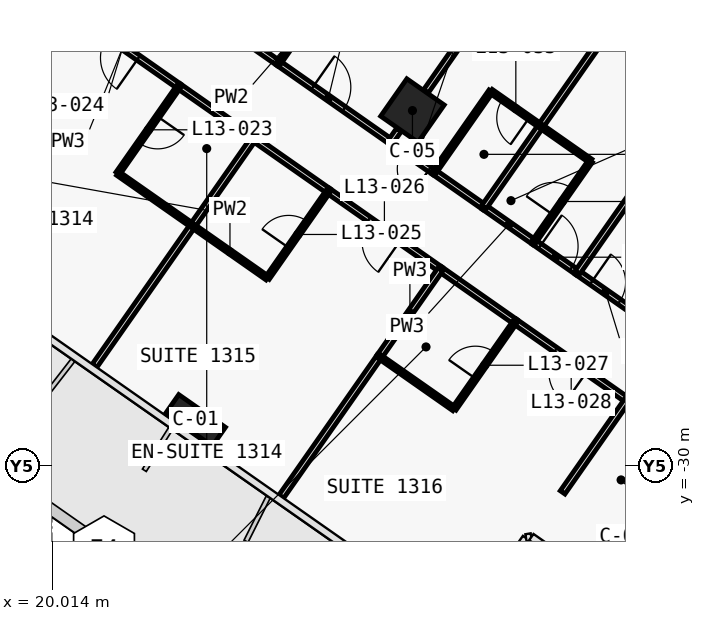
"""IFC4 building model, lengths in metres.
Left out: names, types, materials, properties, quantities, classifications, styles, units other than length and angle.
Written with IfcOpenShell. Run it as: python <this file> out.ifc"""

import sys

from ifc_helpers import new_model, si_unit, direction, frame, frame_2d, origin, origin_2d, place, context, subcontext, project, spatial, rectangle, extrude, clip, halfspace, element, fill, save


model = new_model("IFC4")
c1 = context("Model", 3, precision=1e-05, world=origin(), true_north=direction((0.0, 1.0)))
c2 = subcontext(c1, "Body", "Model", "MODEL_VIEW")
j1 = project(units=[si_unit("LENGTHUNIT", "METRE"), si_unit("PLANEANGLEUNIT", "RADIAN")], contexts=[c1])
p1 = place(None, origin())
s1 = spatial("IfcSite", under=j1, at=p1, CompositionType="ELEMENT")
p2 = place(p1, origin())
s2 = spatial("IfcBuilding", under=s1, at=p2, CompositionType="ELEMENT")
p3 = place(p2, frame((0.0, 0.0, 72.5)))
s3 = spatial("IfcBuildingStorey", under=s2, at=p3, CompositionType="ELEMENT", Elevation=72.5)
p4 = place(p3, frame((23.782, -28.799, 0.0), z_axis=(0.0, 0.0, 1.0), x_axis=(0.819152044289, -0.573576436351, 0.0)))
e1 = element("IfcColumn", 1, at=p4, inside=s3, PredefinedType="COLUMN", context=c2, shape_type="SweptSolid", body=[
    extrude(rectangle(XDim=1.5, YDim=0.6, at=origin_2d()), origin(), (0.0, 0.0, 1.0), 3.6),
])
p5 = place(p3, frame((30.336, -33.388, 0.0), z_axis=(-0.502949209434, 0.352179537956, 0.789310880309), x_axis=(0.646559152129, -0.45273936053, 0.613993757481)))
e2 = element("IfcColumn", 2, at=p5, inside=s3, PredefinedType="COLUMN", context=c2, shape_type="Clipping", body=[
    clip(clip(extrude(rectangle(XDim=1.5, YDim=0.6, at=origin_2d()), origin(), (0.0, 0.0, 1.0), 4.561), halfspace(frame((0.0, 0.0, 0.583), z_axis=(0.0, 0.0, 1.0), x_axis=(1.0, 0.0, 0.0)), True)), halfspace(frame((0.0, 0.0, 3.977), z_axis=(0.0, 0.0, 1.0), x_axis=(1.0, 0.0, 0.0)), False)),
])
p6 = place(p3, frame((35.141, -32.541, 0.0), z_axis=(-0.502933821481, 0.352125233086, 0.789344912846), x_axis=(0.573540565604, 0.819177160086, 0.0)))
e3 = element("IfcColumn", 3, at=p6, inside=s3, PredefinedType="COLUMN", context=c2, shape_type="Clipping", body=[
    clip(clip(extrude(rectangle(XDim=1.5, YDim=0.6, at=origin_2d()), origin(), (0.0, 0.0, 1.0), 4.561), halfspace(frame((0.0, 0.0, 0.233), z_axis=(0.0, 0.0, 1.0), x_axis=(1.0, 0.0, 0.0)), True)), halfspace(frame((0.0, 0.0, 4.327), z_axis=(0.0, 0.0, 1.0), x_axis=(1.0, 0.0, 0.0)), False)),
])
p7 = place(p3, frame((29.49, -20.649, 0.0), z_axis=(0.0, 0.0, 1.0), x_axis=(0.819152044289, -0.573576436351, 0.0)))
e4 = element("IfcColumn", 4, at=p7, inside=s3, PredefinedType="COLUMN", context=c2, shape_type="SweptSolid", body=[
    extrude(rectangle(XDim=1.2, YDim=1.2, at=origin_2d()), origin(), (0.0, 0.0, 1.0), 3.6),
])
p8 = place(p3, frame((25.966, -19.403, 0.0), z_axis=(0.0, 0.0, 1.0), x_axis=(0.81917779803, -0.57353965444, 0.0)))
e5 = element("IfcWall", 5, at=p8, inside=s3, PredefinedType="PARTITIONING", context=c2, shape_type="SweptSolid", body=[
    extrude(rectangle(XDim=3.603, YDim=0.15, at=frame_2d((1.801, 0.0))), origin(), (0.0, 0.0, 1.0), 2.6),
])
p9 = place(p8, frame((1.101, 0.0, 0.0)))
e6 = element("IfcOpeningElement", 6, at=p9, cuts=e5, PredefinedType="OPENING", context=c2, shape_type="SweptSolid", body=[
    extrude(rectangle(XDim=1.0, YDim=2.1, at=frame_2d((0.5, 1.05))), frame((0.0, 0.085, 0.0), z_axis=(0.0, -1.0, 0.0), x_axis=(1.0, 0.0, 0.0)), (0.0, 0.0, 1.0), 0.17),
])
p10 = place(p3, frame((23.999, -18.025, 0.0), z_axis=(0.0, 0.0, 1.0), x_axis=(0.819146032251, -0.573585022335, 0.0)))
e7 = element("IfcWall", 7, at=p10, inside=s3, PredefinedType="PARTITIONING", context=c2, shape_type="SweptSolid", body=[
    extrude(rectangle(XDim=2.404, YDim=0.15, at=frame_2d((1.202, 0.0))), origin(), (0.0, 0.0, 1.0), 3.32),
])
p11 = place(p3, frame((30.063, -22.271, 0.0), z_axis=(0.0, 0.0, 1.0), x_axis=(-0.81914197737, 0.573590813132, 0.0)))
e8 = element("IfcWall", 8, at=p11, inside=s3, PredefinedType="PARTITIONING", context=c2, shape_type="SweptSolid", body=[
    extrude(rectangle(XDim=1.403, YDim=0.15, at=frame_2d((0.701, 0.0))), origin(), (0.0, 0.0, 1.0), 2.6),
])
p12 = place(p11, frame((0.15, 0.0, 0.0)))
e9 = element("IfcOpeningElement", 9, at=p12, cuts=e8, PredefinedType="OPENING", context=c2, shape_type="SweptSolid", body=[
    extrude(rectangle(XDim=0.85, YDim=2.1, at=frame_2d((0.425, 1.05))), frame((0.0, 0.085, 0.0), z_axis=(0.0, -1.0, 0.0), x_axis=(1.0, 0.0, 0.0)), (0.0, 0.0, 1.0), 0.17),
])
p13 = place(p3, frame((30.061, -22.27, 0.0), z_axis=(0.0, 0.0, 1.0), x_axis=(0.819189013667, -0.573523634986, 0.0)))
e10 = element("IfcWall", 10, at=p13, inside=s3, PredefinedType="PARTITIONING", context=c2, shape_type="SweptSolid", body=[
    extrude(rectangle(XDim=1.604, YDim=0.15, at=frame_2d((0.802, 0.0))), origin(), (0.0, 0.0, 1.0), 3.32),
])
p14 = place(p3, frame((32.683, -24.106, 0.0), z_axis=(0.0, 0.0, 1.0), x_axis=(0.819199220913, -0.573509055252, 0.0)))
e11 = element("IfcWall", 11, at=p14, inside=s3, PredefinedType="PARTITIONING", context=c2, shape_type="SweptSolid", body=[
    extrude(rectangle(XDim=1.403, YDim=0.15, at=frame_2d((0.702, 0.0))), origin(), (0.0, 0.0, 1.0), 3.32),
])
p15 = place(p14, frame((0.201, 0.0, 0.0)))
e12 = element("IfcOpeningElement", 12, at=p15, cuts=e11, PredefinedType="OPENING", context=c2, shape_type="SweptSolid", body=[
    extrude(rectangle(XDim=1.0, YDim=2.1, at=frame_2d((0.5, 1.05))), frame((0.0, 0.085, 0.0), z_axis=(0.0, -1.0, 0.0), x_axis=(1.0, 0.0, 0.0)), (0.0, 0.0, 1.0), 0.17),
])
p16 = place(p3, frame((31.372, -23.188, 0.0), z_axis=(0.0, 0.0, 1.0), x_axis=(0.819189013667, -0.573523634986, 0.0)))
e13 = element("IfcWall", 13, at=p16, inside=s3, PredefinedType="PARTITIONING", context=c2, shape_type="SweptSolid", body=[
    extrude(rectangle(XDim=1.604, YDim=0.15, at=frame_2d((0.802, 0.0))), origin(), (0.0, 0.0, 1.0), 3.32),
])
p17 = place(p3, frame((33.829, -24.908, 0.0), z_axis=(0.0, 0.0, 1.0), x_axis=(0.819150860942, -0.573578126342, 0.0)))
e14 = element("IfcWall", 14, at=p17, inside=s3, PredefinedType="PARTITIONING", context=c2, shape_type="SweptSolid", body=[
    extrude(rectangle(XDim=5.802, YDim=0.15, at=frame_2d((2.901, 0.0))), origin(), (0.0, 0.0, 1.0), 2.5),
])
p18 = place(p17, frame((0.451, 0.0, 0.0)))
e15 = element("IfcOpeningElement", 15, at=p18, cuts=e14, PredefinedType="OPENING", context=c2, shape_type="SweptSolid", body=[
    extrude(rectangle(XDim=0.9, YDim=2.1, at=frame_2d((0.45, 1.05))), frame((0.0, 0.085, 0.0), z_axis=(0.0, -1.0, 0.0), x_axis=(1.0, 0.0, 0.0)), (0.0, 0.0, 1.0), 0.17),
])
p19 = place(p3, frame((23.346, -20.01, 0.0), z_axis=(0.0, 0.0, 1.0), x_axis=(-0.819145961204, 0.573585123798, 0.0)))
e16 = element("IfcWall", 16, at=p19, inside=s3, PredefinedType="PARTITIONING", context=c2, shape_type="SweptSolid", body=[
    extrude(rectangle(XDim=3.603, YDim=0.15, at=frame_2d((1.802, 0.0))), origin(), (0.0, 0.0, 1.0), 2.6),
])
p20 = place(p19, frame((1.301, 0.0, 0.0)))
e17 = element("IfcOpeningElement", 17, at=p20, cuts=e16, PredefinedType="OPENING", context=c2, shape_type="SweptSolid", body=[
    extrude(rectangle(XDim=1.0, YDim=2.1, at=frame_2d((0.5, 1.05))), frame((0.0, 0.085, 0.0), z_axis=(0.0, -1.0, 0.0), x_axis=(1.0, 0.0, 0.0)), (0.0, 0.0, 1.0), 0.17),
])
p21 = place(p3, frame((25.313, -21.387, 0.0), z_axis=(0.0, 0.0, 1.0), x_axis=(-0.819146032251, 0.573585022335, 0.0)))
e18 = element("IfcWall", 18, at=p21, inside=s3, PredefinedType="PARTITIONING", context=c2, shape_type="SweptSolid", body=[
    extrude(rectangle(XDim=2.404, YDim=0.15, at=frame_2d((1.202, 0.0))), origin(), (0.0, 0.0, 1.0), 3.32),
])
p22 = place(p3, frame((30.228, -24.828, 0.0), z_axis=(0.0, 0.0, 1.0), x_axis=(-0.819145961204, 0.573585123798, 0.0)))
e19 = element("IfcWall", 19, at=p22, inside=s3, PredefinedType="PARTITIONING", context=c2, shape_type="SweptSolid", body=[
    extrude(rectangle(XDim=3.603, YDim=0.15, at=frame_2d((1.802, 0.0))), origin(), (0.0, 0.0, 1.0), 2.6),
])
p23 = place(p22, frame((1.302, 0.0, 0.0)))
e20 = element("IfcOpeningElement", 20, at=p23, cuts=e19, PredefinedType="OPENING", context=c2, shape_type="SweptSolid", body=[
    extrude(rectangle(XDim=1.0, YDim=2.1, at=frame_2d((0.5, 1.05))), frame((0.0, 0.085, 0.0), z_axis=(0.0, -1.0, 0.0), x_axis=(1.0, 0.0, 0.0)), (0.0, 0.0, 1.0), 0.17),
])
p24 = place(p3, frame((27.279, -22.763, 0.0), z_axis=(0.0, 0.0, 1.0), x_axis=(-0.819146032251, 0.573585022335, 0.0)))
e21 = element("IfcWall", 21, at=p24, inside=s3, PredefinedType="PARTITIONING", context=c2, shape_type="SweptSolid", body=[
    extrude(rectangle(XDim=2.404, YDim=0.15, at=frame_2d((1.202, 0.0))), origin(), (0.0, 0.0, 1.0), 3.32),
])
p25 = place(p3, frame((35.143, -28.27, 0.0), z_axis=(0.0, 0.0, 1.0), x_axis=(-0.819145961204, 0.573585123798, 0.0)))
e22 = element("IfcWall", 22, at=p25, inside=s3, PredefinedType="PARTITIONING", context=c2, shape_type="SweptSolid", body=[
    extrude(rectangle(XDim=3.603, YDim=0.15, at=frame_2d((1.802, 0.0))), origin(), (0.0, 0.0, 1.0), 2.5),
])
p26 = place(p25, frame((1.302, 0.0, 0.0)))
e23 = element("IfcOpeningElement", 23, at=p26, cuts=e22, PredefinedType="OPENING", context=c2, shape_type="SweptSolid", body=[
    extrude(rectangle(XDim=1.0, YDim=2.1, at=frame_2d((0.5, 1.05))), frame((0.0, 0.085, 0.0), z_axis=(0.0, -1.0, 0.0), x_axis=(1.0, 0.0, 0.0)), (0.0, 0.0, 1.0), 0.17),
])
p27 = place(p3, frame((32.194, -26.205, 0.0), z_axis=(0.0, 0.0, 1.0), x_axis=(-0.819146032251, 0.573585022335, 0.0)))
e24 = element("IfcWall", 24, at=p27, inside=s3, PredefinedType="PARTITIONING", context=c2, shape_type="SweptSolid", body=[
    extrude(rectangle(XDim=2.404, YDim=0.15, at=frame_2d((1.202, 0.0))), origin(), (0.0, 0.0, 1.0), 3.32),
])
p28 = place(p3, frame((25.968, -19.404, 0.0), z_axis=(0.0, 0.0, 1.0), x_axis=(0.573591086599, 0.819141785879, 0.0)))
e25 = element("IfcWall", 25, at=p28, inside=s3, PredefinedType="PARTITIONING", context=c2, shape_type="SweptSolid", body=[
    extrude(rectangle(XDim=2.8, YDim=0.12, at=frame_2d((1.4, 0.0))), origin(), (0.0, 0.0, 1.0), 2.6),
])
p29 = place(p28, frame((0.975, 0.0, 0.0)))
e26 = element("IfcOpeningElement", 26, at=p29, cuts=e25, PredefinedType="OPENING", context=c2, shape_type="SweptSolid", body=[
    extrude(rectangle(XDim=0.85, YDim=2.05, at=frame_2d((0.425, 1.025))), frame((0.0, 0.07, 0.0), z_axis=(0.0, -1.0, 0.0), x_axis=(1.0, 0.0, 0.0)), (0.0, 0.0, 1.0), 0.14),
])
p30 = place(p3, frame((35.013, -12.76, 0.0), z_axis=(0.0, 0.0, 1.0), x_axis=(-0.573558725113, -0.819164445546, 0.0)))
e27 = element("IfcWall", 27, at=p30, inside=s3, PredefinedType="PARTITIONING", context=c2, shape_type="SweptSolid", body=[
    extrude(rectangle(XDim=9.01, YDim=0.15, at=frame_2d((4.505, 0.0))), origin(), (0.0, 0.0, 1.0), 2.6),
])
p31 = place(p3, frame((29.134, -21.156, 0.0), z_axis=(0.0, 0.0, 1.0), x_axis=(-0.572944929411, -0.819593867633, 0.0)))
e28 = element("IfcWall", 28, at=p31, inside=s3, PredefinedType="PARTITIONING", context=c2, shape_type="SweptSolid", body=[
    extrude(rectangle(XDim=0.38, YDim=0.15, at=frame_2d((0.19, 0.0))), origin(), (0.0, 0.0, 1.0), 2.6),
])
p32 = place(p3, frame((32.865, -21.058, 0.0), z_axis=(0.0, 0.0, 1.0), x_axis=(-0.819131543282, 0.57360571371, 0.0)))
e29 = element("IfcWall", 29, at=p32, inside=s3, PredefinedType="PARTITIONING", context=c2, shape_type="SweptSolid", body=[
    extrude(rectangle(XDim=1.6, YDim=0.12, at=frame_2d((0.8, 0.0))), origin(), (0.0, 0.0, 1.0), 3.32),
])
p33 = place(p32, frame((0.375, 0.0, 0.0)))
e30 = element("IfcOpeningElement", 30, at=p33, cuts=e29, PredefinedType="OPENING", context=c2, shape_type="SweptSolid", body=[
    extrude(rectangle(XDim=0.85, YDim=2.05, at=frame_2d((0.425, 1.025))), frame((0.0, 0.07, 0.0), z_axis=(0.0, -1.0, 0.0), x_axis=(1.0, 0.0, 0.0)), (0.0, 0.0, 1.0), 0.14),
])
p34 = place(p3, frame((31.553, -20.14, 0.0), z_axis=(0.0, 0.0, 1.0), x_axis=(-0.573537965655, -0.819178980414, 0.0)))
e31 = element("IfcWall", 31, at=p34, inside=s3, PredefinedType="PARTITIONING", context=c2, shape_type="SweptSolid", body=[
    extrude(rectangle(XDim=2.6, YDim=0.12, at=frame_2d((1.3, 0.0))), origin(), (0.0, 0.0, 1.0), 2.6),
])
p35 = place(p3, frame((37.855, -13.932, 0.0), z_axis=(0.0, 0.0, 1.0), x_axis=(-0.573564051961, -0.819160715792, 0.0)))
e32 = element("IfcWall", 32, at=p35, inside=s3, PredefinedType="PARTITIONING", context=c2, shape_type="SweptSolid", body=[
    extrude(rectangle(XDim=8.699, YDim=0.15, at=frame_2d((4.35, 0.0))), origin(), (0.0, 0.0, 1.0), 2.5),
])
p36 = place(p3, frame((32.865, -21.059, 0.0), z_axis=(0.0, 0.0, 1.0), x_axis=(-0.573600972199, -0.819134863556, 0.0)))
e33 = element("IfcWall", 33, at=p36, inside=s3, PredefinedType="PARTITIONING", context=c2, shape_type="SweptSolid", body=[
    extrude(rectangle(XDim=2.6, YDim=0.15, at=frame_2d((1.3, 0.0))), origin(), (0.0, 0.0, 1.0), 2.6),
])
p37 = place(p3, frame((32.685, -24.107, 0.0), z_axis=(0.0, 0.0, 1.0), x_axis=(0.573537965655, 0.819178980414, 0.0)))
e34 = element("IfcWall", 34, at=p37, inside=s3, PredefinedType="PARTITIONING", context=c2, shape_type="SweptSolid", body=[
    extrude(rectangle(XDim=2.6, YDim=0.12, at=frame_2d((1.3, 0.0))), origin(), (0.0, 0.0, 1.0), 2.6),
])
p38 = place(p37, frame((0.875, 0.0, 0.0)))
e35 = element("IfcOpeningElement", 35, at=p38, cuts=e34, PredefinedType="OPENING", context=c2, shape_type="SweptSolid", body=[
    extrude(rectangle(XDim=0.85, YDim=2.05, at=frame_2d((0.425, 1.025))), frame((0.0, 0.07, 0.0), z_axis=(0.0, -1.0, 0.0), x_axis=(1.0, 0.0, 0.0)), (0.0, 0.0, 1.0), 0.14),
])
p39 = place(p3, frame((34.176, -21.976, 0.0), z_axis=(0.0, 0.0, 1.0), x_axis=(-0.819203241359, 0.573503312412, 0.0)))
e36 = element("IfcWall", 36, at=p39, inside=s3, PredefinedType="PARTITIONING", context=c2, shape_type="SweptSolid", body=[
    extrude(rectangle(XDim=1.6, YDim=0.12, at=frame_2d((0.8, 0.0))), origin(), (0.0, 0.0, 1.0), 3.32),
])
p40 = place(p3, frame((39.649, -16.6, 0.0), z_axis=(0.0, 0.0, 1.0), x_axis=(-0.573567334802, -0.819158417187, 0.0)))
e37 = element("IfcWall", 37, at=p40, inside=s3, PredefinedType="PARTITIONING", context=c2, shape_type="SweptSolid", body=[
    extrude(rectangle(XDim=10.144, YDim=0.15, at=frame_2d((5.072, 0.0))), origin(), (0.0, 0.0, 1.0), 2.6),
])
p41 = place(p3, frame((20.396, -17.944, 0.0), z_axis=(0.0, 0.0, 1.0), x_axis=(-0.57359826181, -0.819136761505, 0.0)))
e38 = element("IfcWall", 38, at=p41, inside=s3, PredefinedType="PARTITIONING", context=c2, shape_type="SweptSolid", body=[
    extrude(rectangle(XDim=6.63, YDim=0.15, at=frame_2d((3.315, 0.0))), origin(), (0.0, 0.0, 1.0), 2.6),
])
p42 = place(p3, frame((23.344, -20.008, 0.0), z_axis=(0.0, 0.0, 1.0), x_axis=(-0.573550118428, -0.819170471667, 0.0)))
e39 = element("IfcWall", 39, at=p42, inside=s3, PredefinedType="PARTITIONING", context=c2, shape_type="SweptSolid", body=[
    extrude(rectangle(XDim=2.8, YDim=0.12, at=frame_2d((1.4, 0.0))), origin(), (0.0, 0.0, 1.0), 3.32),
])
p43 = place(p42, frame((0.975, 0.0, 0.0)))
e40 = element("IfcOpeningElement", 40, at=p43, cuts=e39, PredefinedType="OPENING", context=c2, shape_type="SweptSolid", body=[
    extrude(rectangle(XDim=0.85, YDim=2.05, at=frame_2d((0.425, 1.025))), frame((0.0, 0.07, 0.0), z_axis=(0.0, -1.0, 0.0), x_axis=(1.0, 0.0, 0.0)), (0.0, 0.0, 1.0), 0.14),
])
p44 = place(p3, frame((21.739, -22.303, 0.0), z_axis=(0.0, 0.0, 1.0), x_axis=(0.819107643868, -0.573639841501, 0.0)))
e41 = element("IfcWall", 41, at=p44, inside=s3, PredefinedType="PARTITIONING", context=c2, shape_type="SweptSolid", body=[
    extrude(rectangle(XDim=2.4, YDim=0.12, at=frame_2d((1.2, 0.0))), origin(), (0.0, 0.0, 1.0), 3.32),
])
p45 = place(p3, frame((23.705, -23.68, 0.0), z_axis=(0.0, 0.0, 1.0), x_axis=(-0.573553393703, -0.819168178442, 0.0)))
e42 = element("IfcWall", 42, at=p45, inside=s3, PredefinedType="PARTITIONING", context=c2, shape_type="SweptSolid", body=[
    extrude(rectangle(XDim=4.499, YDim=0.15, at=frame_2d((2.25, 0.0))), origin(), (0.0, 0.0, 1.0), 2.5),
])
p46 = place(p3, frame((25.311, -21.385, 0.0), z_axis=(0.0, 0.0, 1.0), x_axis=(-0.573550118428, -0.819170471667, 0.0)))
e43 = element("IfcWall", 43, at=p46, inside=s3, PredefinedType="PARTITIONING", context=c2, shape_type="SweptSolid", body=[
    extrude(rectangle(XDim=2.8, YDim=0.15, at=frame_2d((1.4, 0.0))), origin(), (0.0, 0.0, 1.0), 3.32),
])
p47 = place(p3, frame((23.705, -23.68, 0.0), z_axis=(0.0, 0.0, 1.0), x_axis=(0.819188907105, -0.573523787192, 0.0)))
e44 = element("IfcWall", 44, at=p47, inside=s3, PredefinedType="PARTITIONING", context=c2, shape_type="SweptSolid", body=[
    extrude(rectangle(XDim=2.4, YDim=0.12, at=frame_2d((1.2, 0.0))), origin(), (0.0, 0.0, 1.0), 3.32),
])
p48 = place(p3, frame((25.672, -25.056, 0.0), z_axis=(0.0, 0.0, 1.0), x_axis=(0.573550118428, 0.819170471667, 0.0)))
e45 = element("IfcWall", 45, at=p48, inside=s3, PredefinedType="PARTITIONING", context=c2, shape_type="SweptSolid", body=[
    extrude(rectangle(XDim=2.8, YDim=0.12, at=frame_2d((1.4, 0.0))), origin(), (0.0, 0.0, 1.0), 3.32),
])
p49 = place(p48, frame((0.975, 0.0, 0.0)))
e46 = element("IfcOpeningElement", 46, at=p49, cuts=e45, PredefinedType="OPENING", context=c2, shape_type="SweptSolid", body=[
    extrude(rectangle(XDim=0.85, YDim=2.05, at=frame_2d((0.425, 1.025))), frame((0.0, 0.07, 0.0), z_axis=(0.0, -1.0, 0.0), x_axis=(1.0, 0.0, 0.0)), (0.0, 0.0, 1.0), 0.14),
])
p50 = place(p3, frame((28.621, -27.12, 0.0), z_axis=(0.0, 0.0, 1.0), x_axis=(-0.573593387921, -0.81914017441, 0.0)))
e47 = element("IfcWall", 47, at=p50, inside=s3, PredefinedType="PARTITIONING", context=c2, shape_type="SweptSolid", body=[
    extrude(rectangle(XDim=4.501, YDim=0.15, at=frame_2d((2.25, 0.0))), origin(), (0.0, 0.0, 1.0), 2.5),
])
p51 = place(p3, frame((30.226, -24.827, 0.0), z_axis=(0.0, 0.0, 1.0), x_axis=(-0.573614360281, -0.819125488359, 0.0)))
e48 = element("IfcWall", 48, at=p51, inside=s3, PredefinedType="PARTITIONING", context=c2, shape_type="SweptSolid", body=[
    extrude(rectangle(XDim=2.802, YDim=0.15, at=frame_2d((1.401, 0.0))), origin(), (0.0, 0.0, 1.0), 3.32),
])
p52 = place(p3, frame((28.62, -27.121, 0.0), z_axis=(0.0, 0.0, 1.0), x_axis=(0.819141114317, -0.573592045652, 0.0)))
e49 = element("IfcWall", 49, at=p52, inside=s3, PredefinedType="PARTITIONING", context=c2, shape_type="SweptSolid", body=[
    extrude(rectangle(XDim=2.4, YDim=0.12, at=frame_2d((1.2, 0.0))), origin(), (0.0, 0.0, 1.0), 3.32),
])
p53 = place(p3, frame((30.587, -28.498, 0.0), z_axis=(0.0, 0.0, 1.0), x_axis=(0.573608623498, 0.819129505664, 0.0)))
e50 = element("IfcWall", 50, at=p53, inside=s3, PredefinedType="PARTITIONING", context=c2, shape_type="SweptSolid", body=[
    extrude(rectangle(XDim=2.8, YDim=0.12, at=frame_2d((1.4, 0.0))), origin(), (0.0, 0.0, 1.0), 3.32),
])
p54 = place(p53, frame((0.975, 0.0, 0.0)))
e51 = element("IfcOpeningElement", 51, at=p54, cuts=e50, PredefinedType="OPENING", context=c2, shape_type="SweptSolid", body=[
    extrude(rectangle(XDim=0.85, YDim=2.05, at=frame_2d((0.425, 1.025))), frame((0.0, 0.07, 0.0), z_axis=(0.0, -1.0, 0.0), x_axis=(1.0, 0.0, 0.0)), (0.0, 0.0, 1.0), 0.14),
])
p55 = place(p3, frame((35.141, -28.268, 0.0), z_axis=(0.0, 0.0, 1.0), x_axis=(-0.573578404522, -0.819150666157, 0.0)))
e52 = element("IfcWall", 52, at=p55, inside=s3, PredefinedType="PARTITIONING", context=c2, shape_type="SweptSolid", body=[
    extrude(rectangle(XDim=2.965, YDim=0.15, at=frame_2d((1.482, 0.0))), origin(), (0.0, 0.0, 1.0), 2.5),
])
p56 = place(p43, origin())
e53 = element("IfcDoor", 53, at=p56, inside=s3, OperationType="SINGLE_SWING_LEFT", PredefinedType="DOOR", context=c2, shape_type="SweptSolid", body=[
    extrude(rectangle(XDim=0.85, YDim=2.05, at=frame_2d((0.425, 1.025))), frame((0.0, 0.025, 0.0), z_axis=(0.0, -1.0, 0.0), x_axis=(1.0, 0.0, 0.0)), (0.0, 0.0, 1.0), 0.05),
])
fill(e40, e53)
p57 = place(p20, origin())
e54 = element("IfcDoor", 54, at=p57, inside=s3, OperationType="SINGLE_SWING_RIGHT", PredefinedType="DOOR", context=c2, shape_type="SweptSolid", body=[
    extrude(rectangle(XDim=1.0, YDim=2.1, at=frame_2d((0.5, 1.05))), frame((0.0, 0.025, 0.0), z_axis=(0.0, -1.0, 0.0), x_axis=(1.0, 0.0, 0.0)), (0.0, 0.0, 1.0), 0.05),
])
fill(e17, e54)
p58 = place(p49, origin())
e55 = element("IfcDoor", 55, at=p58, inside=s3, OperationType="SINGLE_SWING_LEFT", PredefinedType="DOOR", context=c2, shape_type="SweptSolid", body=[
    extrude(rectangle(XDim=0.85, YDim=2.05, at=frame_2d((0.425, 1.025))), frame((0.0, 0.025, 0.0), z_axis=(0.0, -1.0, 0.0), x_axis=(1.0, 0.0, 0.0)), (0.0, 0.0, 1.0), 0.05),
])
fill(e46, e55)
p59 = place(p23, origin())
e56 = element("IfcDoor", 56, at=p59, inside=s3, OperationType="SINGLE_SWING_RIGHT", PredefinedType="DOOR", context=c2, shape_type="SweptSolid", body=[
    extrude(rectangle(XDim=1.0, YDim=2.1, at=frame_2d((0.5, 1.05))), frame((0.0, 0.025, 0.0), z_axis=(0.0, -1.0, 0.0), x_axis=(1.0, 0.0, 0.0)), (0.0, 0.0, 1.0), 0.05),
])
fill(e20, e56)
p60 = place(p54, origin())
e57 = element("IfcDoor", 57, at=p60, inside=s3, OperationType="SINGLE_SWING_LEFT", PredefinedType="DOOR", context=c2, shape_type="SweptSolid", body=[
    extrude(rectangle(XDim=0.85, YDim=2.05, at=frame_2d((0.425, 1.025))), frame((0.0, 0.025, 0.0), z_axis=(0.0, -1.0, 0.0), x_axis=(1.0, 0.0, 0.0)), (0.0, 0.0, 1.0), 0.05),
])
fill(e51, e57)
p61 = place(p26, origin())
e58 = element("IfcDoor", 58, at=p61, inside=s3, OperationType="SINGLE_SWING_RIGHT", PredefinedType="DOOR", context=c2, shape_type="SweptSolid", body=[
    extrude(rectangle(XDim=1.0, YDim=2.1, at=frame_2d((0.5, 1.05))), frame((0.0, 0.025, 0.0), z_axis=(0.0, -1.0, 0.0), x_axis=(1.0, 0.0, 0.0)), (0.0, 0.0, 1.0), 0.05),
])
fill(e23, e58)
p62 = place(p9, origin())
e59 = element("IfcDoor", 59, at=p62, inside=s3, OperationType="SINGLE_SWING_RIGHT", PredefinedType="DOOR", context=c2, shape_type="SweptSolid", body=[
    extrude(rectangle(XDim=1.0, YDim=2.1, at=frame_2d((0.5, 1.05))), frame((0.0, 0.025, 0.0), z_axis=(0.0, -1.0, 0.0), x_axis=(1.0, 0.0, 0.0)), (0.0, 0.0, 1.0), 0.05),
])
fill(e6, e59)
p63 = place(p33, origin())
e60 = element("IfcDoor", 60, at=p63, inside=s3, OperationType="SINGLE_SWING_LEFT", PredefinedType="DOOR", context=c2, shape_type="SweptSolid", body=[
    extrude(rectangle(XDim=0.85, YDim=2.05, at=frame_2d((0.425, 1.025))), frame((0.0, 0.025, 0.0), z_axis=(0.0, -1.0, 0.0), x_axis=(1.0, 0.0, 0.0)), (0.0, 0.0, 1.0), 0.05),
])
fill(e30, e60)
p64 = place(p12, origin())
e61 = element("IfcDoor", 61, at=p64, inside=s3, OperationType="SINGLE_SWING_LEFT", PredefinedType="DOOR", context=c2, shape_type="SweptSolid", body=[
    extrude(rectangle(XDim=0.85, YDim=2.1, at=frame_2d((0.425, 1.05))), frame((0.0, 0.025, 0.0), z_axis=(0.0, -1.0, 0.0), x_axis=(1.0, 0.0, 0.0)), (0.0, 0.0, 1.0), 0.05),
])
fill(e9, e61)
p65 = place(p38, origin())
e62 = element("IfcDoor", 62, at=p65, inside=s3, OperationType="SINGLE_SWING_RIGHT", PredefinedType="DOOR", context=c2, shape_type="SweptSolid", body=[
    extrude(rectangle(XDim=0.85, YDim=2.05, at=frame_2d((0.425, 1.025))), frame((0.0, 0.025, 0.0), z_axis=(0.0, -1.0, 0.0), x_axis=(1.0, 0.0, 0.0)), (0.0, 0.0, 1.0), 0.05),
])
fill(e35, e62)
p66 = place(p15, origin())
e63 = element("IfcDoor", 63, at=p66, inside=s3, OperationType="SINGLE_SWING_LEFT", PredefinedType="DOOR", context=c2, shape_type="SweptSolid", body=[
    extrude(rectangle(XDim=1.0, YDim=2.1, at=frame_2d((0.5, 1.05))), frame((0.0, 0.025, 0.0), z_axis=(0.0, -1.0, 0.0), x_axis=(1.0, 0.0, 0.0)), (0.0, 0.0, 1.0), 0.05),
])
fill(e12, e63)
p67 = place(p18, origin())
e64 = element("IfcDoor", 64, at=p67, inside=s3, OperationType="SINGLE_SWING_RIGHT", PredefinedType="DOOR", context=c2, shape_type="SweptSolid", body=[
    extrude(rectangle(XDim=0.9, YDim=2.1, at=frame_2d((0.45, 1.05))), frame((0.0, 0.025, 0.0), z_axis=(0.0, -1.0, 0.0), x_axis=(1.0, 0.0, 0.0)), (0.0, 0.0, 1.0), 0.05),
])
fill(e15, e64)
save(model, sys.argv[1])
